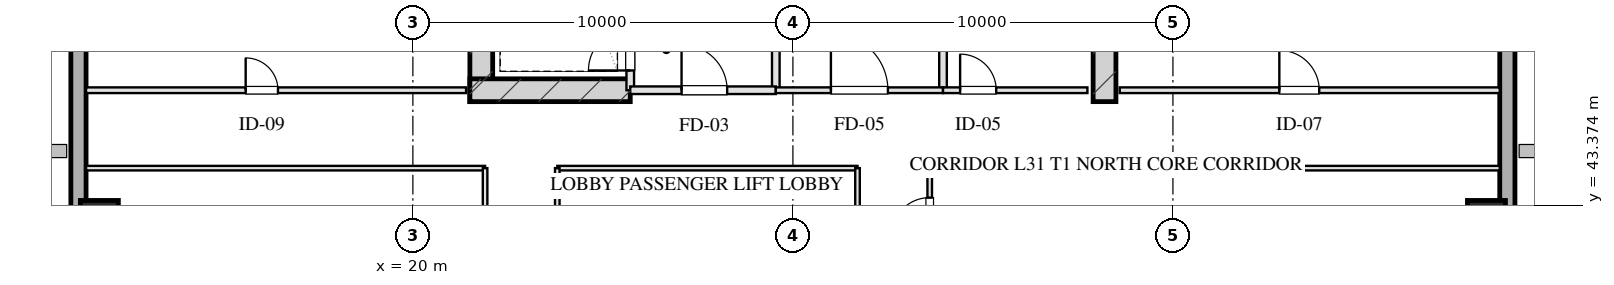
"""IFC4 building model, lengths in metres.
Left out: names, types, materials, properties, quantities, classifications, styles, units other than length and angle.
Written with IfcOpenShell. Run it as: python <this file> out.ifc"""

import sys

from ifc_helpers import new_model, si_unit, direction, frame, frame_2d, origin, origin_2d, place, context, subcontext, project, spatial, rectangle, hollow_rectangle, extrude, element, fill, save


model = new_model("IFC4")
c1 = context("Model", 3, precision=1e-05, world=origin(), true_north=direction((0.0, 1.0)))
c2 = subcontext(c1, "Body", "Model", "MODEL_VIEW")
j1 = project(units=[si_unit("LENGTHUNIT", "METRE"), si_unit("PLANEANGLEUNIT", "RADIAN")], contexts=[c1])
p1 = place(None, origin())
s1 = spatial("IfcSite", under=j1, at=p1, CompositionType="ELEMENT")
p2 = place(p1, origin())
s2 = spatial("IfcBuilding", under=s1, at=p2, CompositionType="ELEMENT")
p3 = place(p2, frame((0.0, 0.0, 120.75)))
s3 = spatial("IfcBuildingStorey", under=s2, at=p3, CompositionType="ELEMENT", Elevation=120.75)
for number, where, z_axis, x_axis in (
    (1, (21.8, 46.1, 0.0), (0.0, 0.0, 1.0), (0.0, 1.0, 0.0)),
    (2, (38.2, 46.1, 0.0), (0.0, 0.0, 1.0), (0.0, 1.0, 0.0)),
):
    element("IfcWall", number, at=place(p3, frame(where, z_axis=z_axis, x_axis=x_axis)), inside=s3, PredefinedType="SHEAR", context=c2, shape_type="SweptSolid", body=[
        extrude(rectangle(XDim=9.48, YDim=0.6, at=frame_2d((4.74, 0.0))), origin(), (0.0, 0.0, 1.0), 3.45),
    ])
p4 = place(p3, frame((21.5, 46.4, 0.0), z_axis=(0.0, 0.0, 1.0), x_axis=(1.0, 0.0, 0.0)))
e3 = element("IfcWall", 3, at=p4, inside=s3, PredefinedType="SHEAR", context=c2, shape_type="SweptSolid", body=[
    extrude(rectangle(XDim=4.22, YDim=0.6, at=frame_2d((2.11, 0.0))), origin(), (0.0, 0.0, 1.0), 3.45),
])
for number, where, z_axis, x_axis in (
    (4, (11.75, 43.0, 0.0), (0.0, 0.0, 1.0), (1.0, 0.0, 0.0)),
    (5, (48.25, 43.0, 0.0), (0.0, 0.0, 1.0), (1.0, 0.0, 0.0)),
):
    element("IfcColumn", number, at=place(p3, frame(where, z_axis=z_axis, x_axis=x_axis)), inside=s3, PredefinedType="COLUMN", context=c2, shape_type="SweptSolid", body=[
        extrude(hollow_rectangle(XDim=1.0, YDim=1.0, WallThickness=0.036, at=origin_2d()), origin(), (0.0, 0.0, 1.0), 3.451),
    ])
p5 = place(p3, frame((11.2, 9.0, 0.0), z_axis=(0.0, 0.0, 1.0), x_axis=(0.0, 1.0, 0.0)))
e6 = element("IfcWall", 6, at=p5, inside=s3, PredefinedType="SOLIDWALL", context=c2, shape_type="SweptSolid", body=[
    extrude(rectangle(XDim=50.0, YDim=0.4, at=frame_2d((25.0, 0.0))), origin(), (0.0, 0.0, 1.0), 2.61),
])
p6 = place(p5, frame((17.4, 0.0, 0.75)))
e7 = element("IfcOpeningElement", 7, at=p6, cuts=e6, PredefinedType="OPENING", context=c2, shape_type="SweptSolid", body=[
    extrude(rectangle(XDim=2.4, YDim=1.46, at=frame_2d((1.2, 0.73))), frame((0.0, 0.21, 0.0), z_axis=(0.0, -1.0, 0.0), x_axis=(1.0, 0.0, 0.0)), (0.0, 0.0, 1.0), 0.42),
])
p7 = place(p5, frame((30.25, 0.0, 0.0)))
e8 = element("IfcOpeningElement", 8, at=p7, cuts=e6, PredefinedType="OPENING", context=c2, shape_type="SweptSolid", body=[
    extrude(rectangle(XDim=1.1, YDim=2.15, at=frame_2d((0.55, 1.075))), frame((0.0, 0.21, 0.0), z_axis=(0.0, -1.0, 0.0), x_axis=(1.0, 0.0, 0.0)), (0.0, 0.0, 1.0), 0.42),
])
p8 = place(p3, frame((48.8, 59.0, 0.0), z_axis=(0.0, 0.0, 1.0), x_axis=(0.0, -1.0, 0.0)))
e9 = element("IfcWall", 9, at=p8, inside=s3, PredefinedType="SOLIDWALL", context=c2, shape_type="SweptSolid", body=[
    extrude(rectangle(XDim=50.0, YDim=0.4, at=frame_2d((25.0, 0.0))), origin(), (0.0, 0.0, 1.0), 2.61),
])
p9 = place(p8, frame((18.583, 0.0, 0.0)))
e10 = element("IfcOpeningElement", 10, at=p9, cuts=e9, PredefinedType="OPENING", context=c2, shape_type="SweptSolid", body=[
    extrude(rectangle(XDim=1.1, YDim=2.15, at=frame_2d((0.55, 1.075))), frame((0.0, 0.21, 0.0), z_axis=(0.0, -1.0, 0.0), x_axis=(1.0, 0.0, 0.0)), (0.0, 0.0, 1.0), 0.42),
])
p10 = place(p3, frame((25.72, 46.4, 0.0), z_axis=(0.0, 0.0, 1.0), x_axis=(0.0, 1.0, 0.0)))
e11 = element("IfcWall", 11, at=p10, inside=s3, PredefinedType="PARTITIONING", context=c2, shape_type="SweptSolid", body=[
    extrude(rectangle(XDim=1.9, YDim=0.2, at=frame_2d((0.95, 0.0))), origin(), (0.0, 0.0, 1.0), 3.175),
])
p11 = place(p10, frame((0.52, 0.0, 0.0)))
e12 = element("IfcOpeningElement", 12, at=p11, cuts=e11, PredefinedType="OPENING", context=c2, shape_type="SweptSolid", body=[
    extrude(rectangle(XDim=1.1, YDim=2.05, at=frame_2d((0.55, 1.025))), frame((0.0, 0.11, 0.0), z_axis=(0.0, -1.0, 0.0), x_axis=(1.0, 0.0, 0.0)), (0.0, 0.0, 1.0), 0.22),
])
p12 = place(p3, frame((29.55, 46.4, 0.0), z_axis=(0.0, 0.0, 1.0), x_axis=(0.0, 1.0, 0.0)))
e13 = element("IfcWall", 13, at=p12, inside=s3, PredefinedType="PARTITIONING", context=c2, shape_type="SweptSolid", body=[
    extrude(rectangle(XDim=8.43, YDim=0.2, at=frame_2d((4.215, 0.0))), origin(), (0.0, 0.0, 1.0), 3.175),
])
p13 = place(p3, frame((25.72, 46.4, 0.0), z_axis=(0.0, 0.0, 1.0), x_axis=(1.0, 0.0, 0.0)))
e14 = element("IfcWall", 14, at=p13, inside=s3, PredefinedType="PARTITIONING", context=c2, shape_type="SweptSolid", body=[
    extrude(rectangle(XDim=3.83, YDim=0.2, at=frame_2d((1.915, 0.0))), origin(), (0.0, 0.0, 1.0), 3.175),
])
p14 = place(p13, frame((1.35, 0.0, 0.0)))
e15 = element("IfcOpeningElement", 15, at=p14, cuts=e14, PredefinedType="OPENING", context=c2, shape_type="SweptSolid", body=[
    extrude(rectangle(XDim=1.2, YDim=2.05, at=frame_2d((0.6, 1.025))), frame((0.0, 0.11, 0.0), z_axis=(0.0, -1.0, 0.0), x_axis=(1.0, 0.0, 0.0)), (0.0, 0.0, 1.0), 0.22),
])
p15 = place(p3, frame((33.95, 46.4, 0.0), z_axis=(0.0, 0.0, 1.0), x_axis=(0.0, 1.0, 0.0)))
e16 = element("IfcWall", 16, at=p15, inside=s3, PredefinedType="PARTITIONING", context=c2, shape_type="SweptSolid", body=[
    extrude(rectangle(XDim=8.43, YDim=0.2, at=frame_2d((4.215, 0.0))), origin(), (0.0, 0.0, 1.0), 3.175),
])
p16 = place(p3, frame((29.55, 46.4, 0.0), z_axis=(0.0, 0.0, 1.0), x_axis=(1.0, 0.0, 0.0)))
e17 = element("IfcWall", 17, at=p16, inside=s3, PredefinedType="PARTITIONING", context=c2, shape_type="SweptSolid", body=[
    extrude(rectangle(XDim=4.4, YDim=0.15, at=frame_2d((2.2, 0.0))), origin(), (0.0, 0.0, 1.0), 3.175),
])
p17 = place(p16, frame((1.45, 0.0, 0.0)))
e18 = element("IfcOpeningElement", 18, at=p17, cuts=e17, PredefinedType="OPENING", context=c2, shape_type="SweptSolid", body=[
    extrude(rectangle(XDim=1.5, YDim=2.05, at=frame_2d((0.75, 1.025))), frame((0.0, 0.085, 0.0), z_axis=(0.0, -1.0, 0.0), x_axis=(1.0, 0.0, 0.0)), (0.0, 0.0, 1.0), 0.17),
])
p18 = place(p3, frame((33.95, 46.4, 0.0), z_axis=(0.0, 0.0, 1.0), x_axis=(1.0, 0.0, 0.0)))
e19 = element("IfcWall", 19, at=p18, inside=s3, PredefinedType="PARTITIONING", context=c2, shape_type="SweptSolid", body=[
    extrude(rectangle(XDim=3.8, YDim=0.15, at=frame_2d((1.9, 0.0))), origin(), (0.0, 0.0, 1.0), 3.175),
])
p19 = place(p18, frame((0.45, 0.0, 0.0)))
e20 = element("IfcOpeningElement", 20, at=p19, cuts=e19, PredefinedType="OPENING", context=c2, shape_type="SweptSolid", body=[
    extrude(rectangle(XDim=0.95, YDim=2.05, at=frame_2d((0.475, 1.025))), frame((0.0, 0.085, 0.0), z_axis=(0.0, -1.0, 0.0), x_axis=(1.0, 0.0, 0.0)), (0.0, 0.0, 1.0), 0.17),
])
p20 = place(p3, frame((11.4, 46.4, 0.0), z_axis=(0.0, 0.0, 1.0), x_axis=(1.0, 0.0, 0.0)))
e21 = element("IfcWall", 21, at=p20, inside=s3, PredefinedType="PARTITIONING", context=c2, shape_type="SweptSolid", body=[
    extrude(rectangle(XDim=10.0, YDim=0.15, at=frame_2d((5.0, 0.0))), origin(), (0.0, 0.0, 1.0), 3.175),
])
p21 = place(p20, frame((4.2, 0.0, 0.0)))
e22 = element("IfcOpeningElement", 22, at=p21, cuts=e21, PredefinedType="OPENING", context=c2, shape_type="SweptSolid", body=[
    extrude(rectangle(XDim=0.85, YDim=2.05, at=frame_2d((0.425, 1.025))), frame((0.0, 0.085, 0.0), z_axis=(0.0, -1.0, 0.0), x_axis=(1.0, 0.0, 0.0)), (0.0, 0.0, 1.0), 0.17),
])
p22 = place(p3, frame((38.6, 46.4, 0.0), z_axis=(0.0, 0.0, 1.0), x_axis=(1.0, 0.0, 0.0)))
e23 = element("IfcWall", 23, at=p22, inside=s3, PredefinedType="PARTITIONING", context=c2, shape_type="SweptSolid", body=[
    extrude(rectangle(XDim=10.0, YDim=0.15, at=frame_2d((5.0, 0.0))), origin(), (0.0, 0.0, 1.0), 3.175),
])
p23 = place(p22, frame((4.2, 0.0, 0.0)))
e24 = element("IfcOpeningElement", 24, at=p23, cuts=e23, PredefinedType="OPENING", context=c2, shape_type="SweptSolid", body=[
    extrude(rectangle(XDim=1.05, YDim=2.05, at=frame_2d((0.525, 1.025))), frame((0.0, 0.085, 0.0), z_axis=(0.0, -1.0, 0.0), x_axis=(1.0, 0.0, 0.0)), (0.0, 0.0, 1.0), 0.17),
])
p24 = place(p3, frame((11.4, 44.35, 0.0), z_axis=(0.0, 0.0, 1.0), x_axis=(1.0, 0.0, 0.0)))
e25 = element("IfcWall", 25, at=p24, inside=s3, PredefinedType="PARTITIONING", context=c2, shape_type="SweptSolid", body=[
    extrude(rectangle(XDim=10.5, YDim=0.12, at=frame_2d((5.25, 0.0))), origin(), (0.0, 0.0, 1.0), 3.175),
])
p25 = place(p3, frame((23.8, 44.35, 0.0), z_axis=(0.0, 0.0, 1.0), x_axis=(1.0, 0.0, 0.0)))
e26 = element("IfcWall", 26, at=p25, inside=s3, PredefinedType="PARTITIONING", context=c2, shape_type="SweptSolid", body=[
    extrude(rectangle(XDim=7.9, YDim=0.12, at=frame_2d((3.95, 0.0))), origin(), (0.0, 0.0, 1.0), 3.175),
])
p26 = place(p3, frame((33.6, 44.35, 0.0), z_axis=(0.0, 0.0, 1.0), x_axis=(1.0, 0.0, 0.0)))
e27 = element("IfcWall", 27, at=p26, inside=s3, PredefinedType="PARTITIONING", context=c2, shape_type="SweptSolid", body=[
    extrude(rectangle(XDim=15.0, YDim=0.12, at=frame_2d((7.5, 0.0))), origin(), (0.0, 0.0, 1.0), 3.175),
])
p27 = place(p3, frame((21.9, 23.65, 0.0), z_axis=(0.0, 0.0, 1.0), x_axis=(0.0, 1.0, 0.0)))
e28 = element("IfcWall", 28, at=p27, inside=s3, PredefinedType="PARTITIONING", context=c2, shape_type="SweptSolid", body=[
    extrude(rectangle(XDim=20.7, YDim=0.12, at=frame_2d((10.35, 0.0))), origin(), (0.0, 0.0, 1.0), 3.175),
])
p28 = place(p27, frame((2.675, 0.0, 0.0)))
e29 = element("IfcOpeningElement", 29, at=p28, cuts=e28, PredefinedType="OPENING", context=c2, shape_type="SweptSolid", body=[
    extrude(rectangle(XDim=1.0, YDim=2.05, at=frame_2d((0.5, 1.025))), frame((0.0, 0.07, 0.0), z_axis=(0.0, -1.0, 0.0), x_axis=(1.0, 0.0, 0.0)), (0.0, 0.0, 1.0), 0.14),
])
p29 = place(p27, frame((9.85, 0.0, 0.0)))
e30 = element("IfcOpeningElement", 30, at=p29, cuts=e28, PredefinedType="OPENING", context=c2, shape_type="SweptSolid", body=[
    extrude(rectangle(XDim=1.0, YDim=2.05, at=frame_2d((0.5, 1.025))), frame((0.0, 0.07, 0.0), z_axis=(0.0, -1.0, 0.0), x_axis=(1.0, 0.0, 0.0)), (0.0, 0.0, 1.0), 0.14),
])
p30 = place(p27, frame((17.025, 0.0, 0.0)))
e31 = element("IfcOpeningElement", 31, at=p30, cuts=e28, PredefinedType="OPENING", context=c2, shape_type="SweptSolid", body=[
    extrude(rectangle(XDim=1.0, YDim=2.05, at=frame_2d((0.5, 1.025))), frame((0.0, 0.07, 0.0), z_axis=(0.0, -1.0, 0.0), x_axis=(1.0, 0.0, 0.0)), (0.0, 0.0, 1.0), 0.14),
])
p31 = place(p3, frame((23.8, 23.65, 0.0), z_axis=(0.0, 0.0, 1.0), x_axis=(0.0, 1.0, 0.0)))
e32 = element("IfcWall", 32, at=p31, inside=s3, PredefinedType="PARTITIONING", context=c2, shape_type="SweptSolid", body=[
    extrude(rectangle(XDim=20.7, YDim=0.12, at=frame_2d((10.35, 0.0))), origin(), (0.0, 0.0, 1.0), 3.175),
])
p32 = place(p31, frame((2.857, 0.0, 0.0)))
e33 = element("IfcOpeningElement", 33, at=p32, cuts=e32, PredefinedType="OPENING", context=c2, shape_type="SweptSolid", body=[
    extrude(rectangle(XDim=1.1, YDim=2.05, at=frame_2d((0.55, 1.025))), frame((0.0, 0.07, 0.0), z_axis=(0.0, -1.0, 0.0), x_axis=(1.0, 0.0, 0.0)), (0.0, 0.0, 1.0), 0.14),
])
p33 = place(p31, frame((17.189, 0.0, 0.0)))
e34 = element("IfcOpeningElement", 34, at=p33, cuts=e32, PredefinedType="OPENING", context=c2, shape_type="SweptSolid", body=[
    extrude(rectangle(XDim=1.1, YDim=2.05, at=frame_2d((0.55, 1.025))), frame((0.0, 0.07, 0.0), z_axis=(0.0, -1.0, 0.0), x_axis=(1.0, 0.0, 0.0)), (0.0, 0.0, 1.0), 0.14),
])
p34 = place(p3, frame((31.7, 23.65, 0.0), z_axis=(0.0, 0.0, 1.0), x_axis=(0.0, 1.0, 0.0)))
e35 = element("IfcWall", 35, at=p34, inside=s3, PredefinedType="PARTITIONING", context=c2, shape_type="SweptSolid", body=[
    extrude(rectangle(XDim=20.7, YDim=0.12, at=frame_2d((10.35, 0.0))), origin(), (0.0, 0.0, 1.0), 3.175),
])
p35 = place(p34, frame((9.696, 0.0, 0.0)))
e36 = element("IfcOpeningElement", 36, at=p35, cuts=e35, PredefinedType="OPENING", context=c2, shape_type="SweptSolid", body=[
    extrude(rectangle(XDim=1.1, YDim=2.05, at=frame_2d((0.55, 1.025))), frame((0.0, 0.07, 0.0), z_axis=(0.0, -1.0, 0.0), x_axis=(1.0, 0.0, 0.0)), (0.0, 0.0, 1.0), 0.14),
])
p36 = place(p3, frame((33.6, 23.65, 0.0), z_axis=(0.0, 0.0, 1.0), x_axis=(0.0, 1.0, 0.0)))
e37 = element("IfcWall", 37, at=p36, inside=s3, PredefinedType="PARTITIONING", context=c2, shape_type="SweptSolid", body=[
    extrude(rectangle(XDim=20.7, YDim=0.12, at=frame_2d((10.35, 0.0))), origin(), (0.0, 0.0, 1.0), 3.175),
])
p37 = place(p36, frame((0.775, 0.0, 0.0)))
e38 = element("IfcOpeningElement", 38, at=p37, cuts=e37, PredefinedType="OPENING", context=c2, shape_type="SweptSolid", body=[
    extrude(rectangle(XDim=1.05, YDim=2.05, at=frame_2d((0.525, 1.025))), frame((0.0, 0.07, 0.0), z_axis=(0.0, -1.0, 0.0), x_axis=(1.0, 0.0, 0.0)), (0.0, 0.0, 1.0), 0.14),
])
p38 = place(p36, frame((3.95, 0.0, 0.0)))
e39 = element("IfcOpeningElement", 39, at=p38, cuts=e37, PredefinedType="OPENING", context=c2, shape_type="SweptSolid", body=[
    extrude(rectangle(XDim=1.0, YDim=2.05, at=frame_2d((0.5, 1.025))), frame((0.0, 0.07, 0.0), z_axis=(0.0, -1.0, 0.0), x_axis=(1.0, 0.0, 0.0)), (0.0, 0.0, 1.0), 0.14),
])
p39 = place(p36, frame((8.19, 0.0, 0.0)))
e40 = element("IfcOpeningElement", 40, at=p39, cuts=e37, PredefinedType="OPENING", context=c2, shape_type="SweptSolid", body=[
    extrude(rectangle(XDim=1.0, YDim=2.05, at=frame_2d((0.5, 1.025))), frame((0.0, 0.07, 0.0), z_axis=(0.0, -1.0, 0.0), x_axis=(1.0, 0.0, 0.0)), (0.0, 0.0, 1.0), 0.14),
])
p40 = place(p36, frame((12.257, 0.0, 0.0)))
e41 = element("IfcOpeningElement", 41, at=p40, cuts=e37, PredefinedType="OPENING", context=c2, shape_type="SweptSolid", body=[
    extrude(rectangle(XDim=0.85, YDim=2.05, at=frame_2d((0.425, 1.025))), frame((0.0, 0.07, 0.0), z_axis=(0.0, -1.0, 0.0), x_axis=(1.0, 0.0, 0.0)), (0.0, 0.0, 1.0), 0.14),
])
p41 = place(p36, frame((15.816, 0.0, 0.0)))
e42 = element("IfcOpeningElement", 42, at=p41, cuts=e37, PredefinedType="OPENING", context=c2, shape_type="SweptSolid", body=[
    extrude(rectangle(XDim=1.0, YDim=2.05, at=frame_2d((0.5, 1.025))), frame((0.0, 0.07, 0.0), z_axis=(0.0, -1.0, 0.0), x_axis=(1.0, 0.0, 0.0)), (0.0, 0.0, 1.0), 0.14),
])
p42 = place(p36, frame((18.925, 0.0, 0.0)))
e43 = element("IfcOpeningElement", 43, at=p42, cuts=e37, PredefinedType="OPENING", context=c2, shape_type="SweptSolid", body=[
    extrude(rectangle(XDim=1.0, YDim=2.05, at=frame_2d((0.5, 1.025))), frame((0.0, 0.07, 0.0), z_axis=(0.0, -1.0, 0.0), x_axis=(1.0, 0.0, 0.0)), (0.0, 0.0, 1.0), 0.14),
])
p43 = place(p11, origin())
e44 = element("IfcDoor", 44, at=p43, inside=s3, OperationType="SINGLE_SWING_LEFT", PredefinedType="DOOR", context=c2, shape_type="SweptSolid", body=[
    extrude(rectangle(XDim=1.1, YDim=2.05, at=frame_2d((0.55, 1.025))), frame((0.0, 0.025, 0.0), z_axis=(0.0, -1.0, 0.0), x_axis=(1.0, 0.0, 0.0)), (0.0, 0.0, 1.0), 0.05),
])
fill(e12, e44)
p44 = place(p14, origin())
e45 = element("IfcDoor", 45, at=p44, inside=s3, OperationType="SINGLE_SWING_LEFT", PredefinedType="DOOR", context=c2, shape_type="SweptSolid", body=[
    extrude(rectangle(XDim=1.2, YDim=2.05, at=frame_2d((0.6, 1.025))), frame((0.0, 0.025, 0.0), z_axis=(0.0, -1.0, 0.0), x_axis=(1.0, 0.0, 0.0)), (0.0, 0.0, 1.0), 0.05),
])
fill(e15, e45)
p45 = place(p17, origin())
e46 = element("IfcDoor", 46, at=p45, inside=s3, OperationType="SINGLE_SWING_LEFT", PredefinedType="DOOR", context=c2, shape_type="SweptSolid", body=[
    extrude(rectangle(XDim=1.5, YDim=2.05, at=frame_2d((0.75, 1.025))), frame((0.0, 0.025, 0.0), z_axis=(0.0, -1.0, 0.0), x_axis=(1.0, 0.0, 0.0)), (0.0, 0.0, 1.0), 0.05),
])
fill(e18, e46)
p46 = place(p19, origin())
e47 = element("IfcDoor", 47, at=p46, inside=s3, OperationType="SINGLE_SWING_LEFT", PredefinedType="DOOR", context=c2, shape_type="SweptSolid", body=[
    extrude(rectangle(XDim=0.95, YDim=2.05, at=frame_2d((0.475, 1.025))), frame((0.0, 0.025, 0.0), z_axis=(0.0, -1.0, 0.0), x_axis=(1.0, 0.0, 0.0)), (0.0, 0.0, 1.0), 0.05),
])
fill(e20, e47)
p47 = place(p21, origin())
e48 = element("IfcDoor", 48, at=p47, inside=s3, OperationType="SINGLE_SWING_LEFT", PredefinedType="DOOR", context=c2, shape_type="SweptSolid", body=[
    extrude(rectangle(XDim=0.85, YDim=2.05, at=frame_2d((0.425, 1.025))), frame((0.0, 0.025, 0.0), z_axis=(0.0, -1.0, 0.0), x_axis=(1.0, 0.0, 0.0)), (0.0, 0.0, 1.0), 0.05),
])
fill(e22, e48)
p48 = place(p23, origin())
e49 = element("IfcDoor", 49, at=p48, inside=s3, OperationType="SINGLE_SWING_LEFT", PredefinedType="DOOR", context=c2, shape_type="SweptSolid", body=[
    extrude(rectangle(XDim=1.05, YDim=2.05, at=frame_2d((0.525, 1.025))), frame((0.0, 0.025, 0.0), z_axis=(0.0, -1.0, 0.0), x_axis=(1.0, 0.0, 0.0)), (0.0, 0.0, 1.0), 0.05),
])
fill(e24, e49)
p49 = place(p42, origin())
e50 = element("IfcDoor", 50, at=p49, inside=s3, OperationType="SINGLE_SWING_LEFT", PredefinedType="DOOR", context=c2, shape_type="SweptSolid", body=[
    extrude(rectangle(XDim=1.0, YDim=2.05, at=frame_2d((0.5, 1.025))), frame((0.0, 0.025, 0.0), z_axis=(0.0, -1.0, 0.0), x_axis=(1.0, 0.0, 0.0)), (0.0, 0.0, 1.0), 0.05),
])
fill(e43, e50)
save(model, sys.argv[1])
